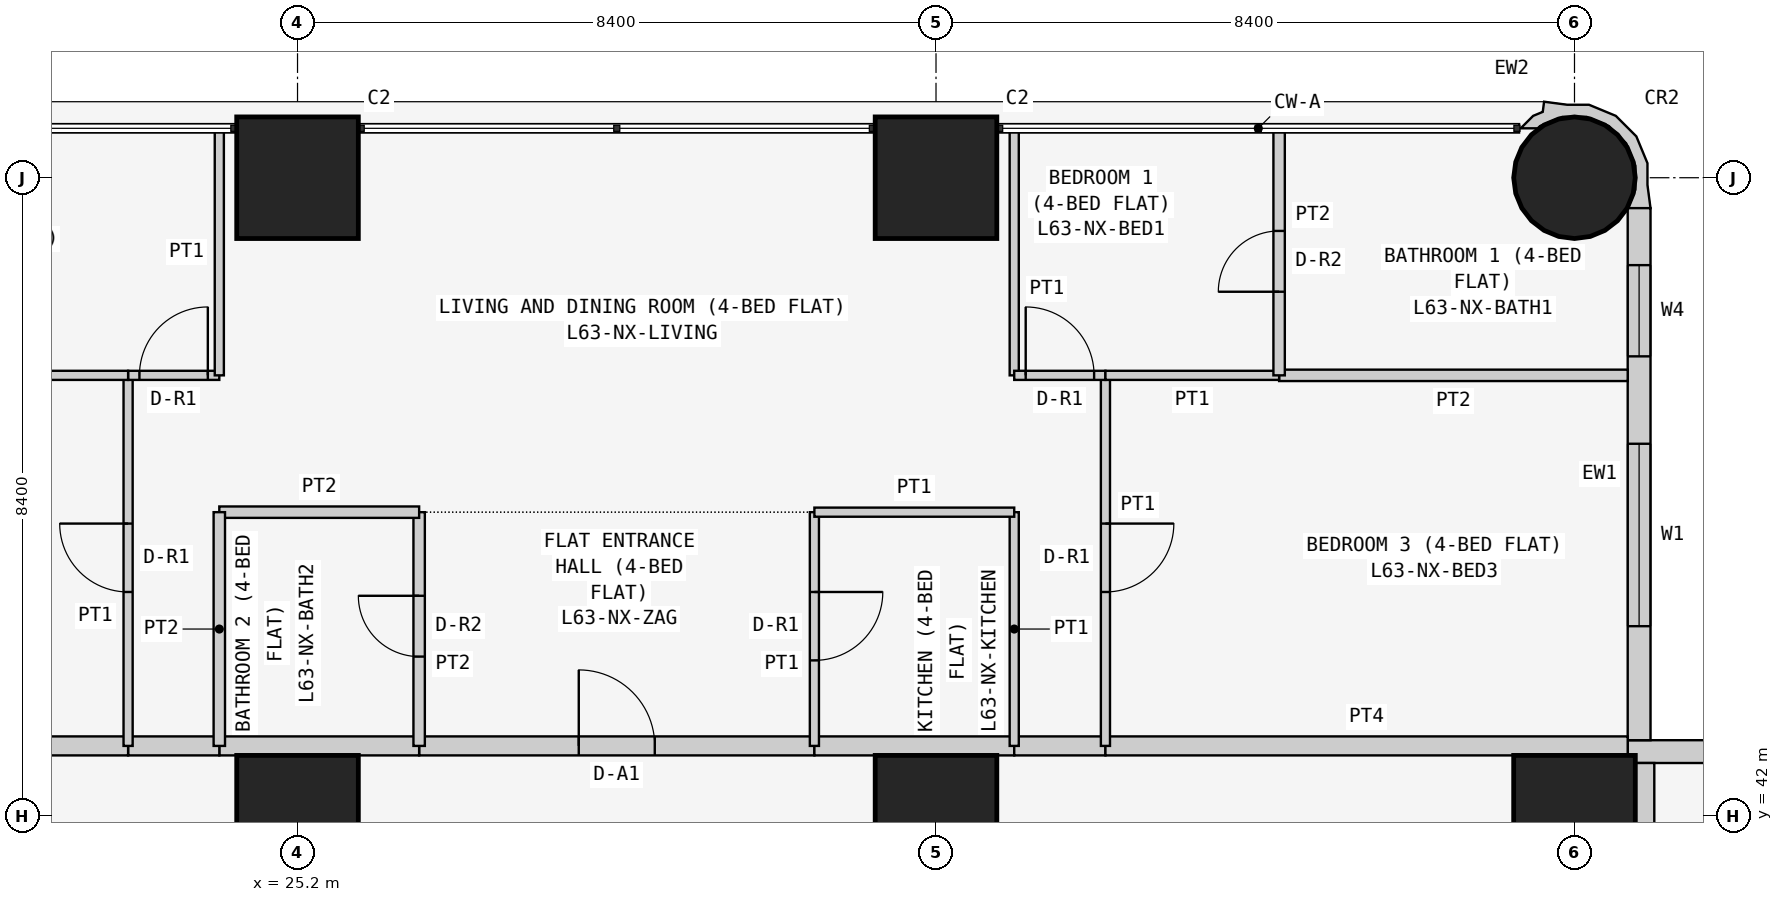
"""IFC4 building model, lengths in metres.
Left out: names, types, materials, properties, quantities, classifications, styles, units other than length and angle.
Written with IfcOpenShell. Run it as: python <this file> out.ifc"""

import sys

from ifc_helpers import new_model, si_unit, direction, frame, frame_2d, origin, origin_2d, place, context, subcontext, project, spatial, polyline, rectangle, circle, outline, extrude, element, fill, save


model = new_model("IFC4")
c1 = context("Model", 3, precision=1e-05, world=origin(), true_north=direction((0.0, 1.0)))
c2 = subcontext(c1, "Body", "Model", "MODEL_VIEW")
j1 = project(units=[si_unit("LENGTHUNIT", "METRE"), si_unit("PLANEANGLEUNIT", "RADIAN")], contexts=[c1])
p1 = place(None, origin())
s1 = spatial("IfcSite", under=j1, at=p1, CompositionType="ELEMENT")
p2 = place(p1, origin())
s2 = spatial("IfcBuilding", under=s1, at=p2, CompositionType="ELEMENT")
p3 = place(p2, frame((0.0, 0.0, 240.9)))
s3 = spatial("IfcBuildingStorey", under=s2, at=p3, CompositionType="ELEMENT", Elevation=240.9)
for number, where, z_axis, x_axis in (
    (1, (25.2, 42.0, 0.0), (0.0, 0.0, 1.0), (1.0, 0.0, 0.0)),
    (2, (25.2, 50.4, 0.0), (0.0, 0.0, 1.0), (1.0, 0.0, 0.0)),
    (3, (33.6, 42.0, 0.0), (0.0, 0.0, 1.0), (1.0, 0.0, 0.0)),
    (4, (33.6, 50.4, 0.0), (0.0, 0.0, 1.0), (1.0, 0.0, 0.0)),
    (5, (42.0, 42.0, 0.0), (0.0, 0.0, 1.0), (1.0, 0.0, 0.0)),
):
    element("IfcColumn", number, at=place(p3, frame(where, z_axis=z_axis, x_axis=x_axis)), inside=s3, PredefinedType="COLUMN", context=c2, shape_type="SweptSolid", body=[
        extrude(rectangle(XDim=1.6, YDim=1.6, at=origin_2d()), origin(), (0.0, 0.0, 1.0), 3.6),
    ])
p4 = place(p3, frame((42.0, 50.4, 0.0), z_axis=(0.0, 0.0, 1.0), x_axis=(1.0, 0.0, 0.0)))
e6 = element("IfcColumn", 6, at=p4, inside=s3, PredefinedType="COLUMN", context=c2, shape_type="SweptSolid", body=[
    extrude(circle(Radius=0.8, at=origin_2d()), origin(), (0.0, 0.0, 1.0), 3.6),
])
p5 = place(p3, frame((50.0, 42.85, 0.0), z_axis=(0.0, 0.0, 1.0), x_axis=(-1.0, 0.0, 0.0)))
e7 = element("IfcWall", 7, at=p5, inside=s3, PredefinedType="SOLIDWALL", context=c2, shape_type="SweptSolid", body=[
    extrude(rectangle(XDim=7.3, YDim=0.3, at=frame_2d((3.65, 0.0))), origin(), (0.0, 0.0, 1.0), 3.45),
])
p6 = place(p5, frame((3.1, 0.0, 0.9)))
e8 = element("IfcOpeningElement", 8, at=p6, cuts=e7, PredefinedType="OPENING", context=c2, shape_type="SweptSolid", body=[
    extrude(rectangle(XDim=2.4, YDim=1.5, at=frame_2d((1.2, 0.75))), frame((0.0, 0.16, 0.0), z_axis=(0.0, -1.0, 0.0), x_axis=(1.0, 0.0, 0.0)), (0.0, 0.0, 1.0), 0.32),
])
p7 = place(p5, frame((0.75, 0.0, 0.9)))
e9 = element("IfcOpeningElement", 9, at=p7, cuts=e7, PredefinedType="OPENING", context=c2, shape_type="SweptSolid", body=[
    extrude(rectangle(XDim=1.2, YDim=1.5, at=frame_2d((0.6, 0.75))), frame((0.0, 0.16, 0.0), z_axis=(0.0, -1.0, 0.0), x_axis=(1.0, 0.0, 0.0)), (0.0, 0.0, 1.0), 0.32),
])
p8 = place(p3, frame((42.85, 43.0, 0.0), z_axis=(0.0, 0.0, 1.0), x_axis=(0.0, 1.0, 0.0)))
e10 = element("IfcWall", 10, at=p8, inside=s3, PredefinedType="SOLIDWALL", context=c2, shape_type="SweptSolid", body=[
    extrude(rectangle(XDim=7.0, YDim=0.3, at=frame_2d((3.5, 0.0))), origin(), (0.0, 0.0, 1.0), 3.45),
])
p9 = place(p8, frame((1.5, 0.0, 0.9)))
e11 = element("IfcOpeningElement", 11, at=p9, cuts=e10, PredefinedType="OPENING", context=c2, shape_type="SweptSolid", body=[
    extrude(rectangle(XDim=2.4, YDim=1.5, at=frame_2d((1.2, 0.75))), frame((0.0, 0.16, 0.0), z_axis=(0.0, -1.0, 0.0), x_axis=(1.0, 0.0, 0.0)), (0.0, 0.0, 1.0), 0.32),
])
p10 = place(p8, frame((5.05, 0.0, 0.9)))
e12 = element("IfcOpeningElement", 12, at=p10, cuts=e10, PredefinedType="OPENING", context=c2, shape_type="SweptSolid", body=[
    extrude(rectangle(XDim=1.2, YDim=1.5, at=frame_2d((0.6, 0.75))), frame((0.0, 0.16, 0.0), z_axis=(0.0, -1.0, 0.0), x_axis=(1.0, 0.0, 0.0)), (0.0, 0.0, 1.0), 0.32),
])
p11 = place(p3, frame((42.817, 50.073, 0.0), z_axis=(0.0, 0.0, 1.0), x_axis=(0.343276641956, 0.93923434088, 0.0)))
e13 = element("IfcWall", 13, at=p11, inside=s3, PredefinedType="SOLIDWALL", context=c2, shape_type="SweptSolid", body=[
    extrude(outline(polyline([(0.266, -0.055), (0.535, 0.044), (0.817, 0.302), (0.978, 0.648), (0.994, 1.03), (0.895, 1.3), (0.828, 1.598), (0.697, 1.569), (0.604, 1.67), (0.394, 1.767), (0.471, 1.556), (0.509, 1.539), (0.724, 1.304), (0.833, 1.005), (0.82, 0.687), (0.686, 0.397), (0.451, 0.182), (0.152, 0.073), (-0.116, 0.084), (-0.128, 0.078), (-0.146, 0.071), (-0.006, -0.197), (0.266, -0.055)])), origin(), (0.0, 0.0, 1.0), 3.45),
])
p12 = place(p3, frame((26.8, 42.925, 0.0), z_axis=(0.0, 0.0, 1.0), x_axis=(1.0, 0.0, 0.0)))
e14 = element("IfcWall", 14, at=p12, inside=s3, PredefinedType="PARTITIONING", context=c2, shape_type="SweptSolid", body=[
    extrude(rectangle(XDim=5.2, YDim=0.25, at=frame_2d((2.6, 0.0))), origin(), (0.0, 0.0, 1.0), 3.45),
])
p13 = place(p12, frame((2.1, 0.0, 0.0)))
e15 = element("IfcOpeningElement", 15, at=p13, cuts=e14, PredefinedType="OPENING", context=c2, shape_type="SweptSolid", body=[
    extrude(rectangle(XDim=1.0, YDim=2.1, at=frame_2d((0.5, 1.05))), frame((0.0, 0.135, 0.0), z_axis=(0.0, -1.0, 0.0), x_axis=(1.0, 0.0, 0.0)), (0.0, 0.0, 1.0), 0.27),
])
p14 = place(p3, frame((24.171, 42.925, 0.0), z_axis=(0.0, 0.0, 1.0), x_axis=(1.0, 0.0, 0.0)))
e16 = element("IfcWall", 16, at=p14, inside=s3, PredefinedType="PARTITIONING", context=c2, shape_type="SweptSolid", body=[
    extrude(rectangle(XDim=2.629, YDim=0.25, at=frame_2d((1.314, 0.0))), origin(), (0.0, 0.0, 1.0), 3.45),
])
p15 = place(p3, frame((32.0, 42.925, 0.0), z_axis=(0.0, 0.0, 1.0), x_axis=(1.0, 0.0, 0.0)))
e17 = element("IfcWall", 17, at=p15, inside=s3, PredefinedType="PARTITIONING", context=c2, shape_type="SweptSolid", body=[
    extrude(rectangle(XDim=2.629, YDim=0.25, at=frame_2d((1.314, 0.0))), origin(), (0.0, 0.0, 1.0), 3.45),
])
p16 = place(p3, frame((22.971, 42.925, 0.0), z_axis=(0.0, 0.0, 1.0), x_axis=(1.0, 0.0, 0.0)))
e18 = element("IfcWall", 18, at=p16, inside=s3, PredefinedType="PARTITIONING", context=c2, shape_type="SweptSolid", body=[
    extrude(rectangle(XDim=1.2, YDim=0.25, at=frame_2d((0.6, 0.0))), origin(), (0.0, 0.0, 1.0), 3.45),
])
p17 = place(p3, frame((34.629, 42.925, 0.0), z_axis=(0.0, 0.0, 1.0), x_axis=(1.0, 0.0, 0.0)))
e19 = element("IfcWall", 19, at=p17, inside=s3, PredefinedType="PARTITIONING", context=c2, shape_type="SweptSolid", body=[
    extrude(rectangle(XDim=1.2, YDim=0.25, at=frame_2d((0.6, 0.0))), origin(), (0.0, 0.0, 1.0), 3.45),
])
for number, where, z_axis, x_axis in (
    (20, (16.1, 42.925, 0.0), (0.0, 0.0, 1.0), (1.0, 0.0, 0.0)),
    (21, (35.829, 42.925, 0.0), (0.0, 0.0, 1.0), (1.0, 0.0, 0.0)),
):
    element("IfcWall", number, at=place(p3, frame(where, z_axis=z_axis, x_axis=x_axis)), inside=s3, PredefinedType="PARTITIONING", context=c2, shape_type="SweptSolid", body=[
        extrude(rectangle(XDim=6.871, YDim=0.25, at=frame_2d((3.436, 0.0))), origin(), (0.0, 0.0, 1.0), 3.45),
    ])
p18 = place(p3, frame((42.925, 42.7, 0.0), z_axis=(0.0, 0.0, 1.0), x_axis=(0.0, -1.0, 0.0)))
e22 = element("IfcWall", 22, at=p18, inside=s3, PredefinedType="PARTITIONING", context=c2, shape_type="SweptSolid", body=[
    extrude(rectangle(XDim=6.471, YDim=0.25, at=frame_2d((3.235, 0.0))), origin(), (0.0, 0.0, 1.0), 3.45),
])
p19 = place(p3, frame((26.8, 46.0, 0.0), z_axis=(0.0, 0.0, 1.0), x_axis=(0.0, -1.0, 0.0)))
e23 = element("IfcWall", 23, at=p19, inside=s3, PredefinedType="PARTITIONING", context=c2, shape_type="SweptSolid", body=[
    extrude(rectangle(XDim=3.075, YDim=0.15, at=frame_2d((1.538, 0.0))), origin(), (0.0, 0.0, 1.0), 3.45),
])
p20 = place(p19, frame((1.1, 0.0, 0.0)))
e24 = element("IfcOpeningElement", 24, at=p20, cuts=e23, PredefinedType="OPENING", context=c2, shape_type="SweptSolid", body=[
    extrude(rectangle(XDim=0.8, YDim=2.1, at=frame_2d((0.4, 1.05))), frame((0.0, 0.085, 0.0), z_axis=(0.0, -1.0, 0.0), x_axis=(1.0, 0.0, 0.0)), (0.0, 0.0, 1.0), 0.17),
])
p21 = place(p3, frame((32.0, 42.925, 0.0), z_axis=(0.0, 0.0, 1.0), x_axis=(0.0, 1.0, 0.0)))
e25 = element("IfcWall", 25, at=p21, inside=s3, PredefinedType="PARTITIONING", context=c2, shape_type="SweptSolid", body=[
    extrude(rectangle(XDim=3.075, YDim=0.12, at=frame_2d((1.538, 0.0))), origin(), (0.0, 0.0, 1.0), 3.45),
])
p22 = place(p21, frame((1.125, 0.0, 0.0)))
e26 = element("IfcOpeningElement", 26, at=p22, cuts=e25, PredefinedType="OPENING", context=c2, shape_type="SweptSolid", body=[
    extrude(rectangle(XDim=0.9, YDim=2.1, at=frame_2d((0.45, 1.05))), frame((0.0, 0.07, 0.0), z_axis=(0.0, -1.0, 0.0), x_axis=(1.0, 0.0, 0.0)), (0.0, 0.0, 1.0), 0.14),
])
p23 = place(p3, frame((26.8, 46.0, 0.0), z_axis=(0.0, 0.0, 1.0), x_axis=(-1.0, 0.0, 0.0)))
e27 = element("IfcWall", 27, at=p23, inside=s3, PredefinedType="PARTITIONING", context=c2, shape_type="SweptSolid", body=[
    extrude(rectangle(XDim=2.629, YDim=0.15, at=frame_2d((1.314, 0.0))), origin(), (0.0, 0.0, 1.0), 3.45),
])
p24 = place(p3, frame((24.171, 46.0, 0.0), z_axis=(0.0, 0.0, 1.0), x_axis=(0.0, -1.0, 0.0)))
e28 = element("IfcWall", 28, at=p24, inside=s3, PredefinedType="PARTITIONING", context=c2, shape_type="SweptSolid", body=[
    extrude(rectangle(XDim=3.075, YDim=0.15, at=frame_2d((1.538, 0.0))), origin(), (0.0, 0.0, 1.0), 3.45),
])
p25 = place(p3, frame((34.629, 42.925, 0.0), z_axis=(0.0, 0.0, 1.0), x_axis=(0.0, 1.0, 0.0)))
e29 = element("IfcWall", 29, at=p25, inside=s3, PredefinedType="PARTITIONING", context=c2, shape_type="SweptSolid", body=[
    extrude(rectangle(XDim=3.075, YDim=0.12, at=frame_2d((1.538, 0.0))), origin(), (0.0, 0.0, 1.0), 3.45),
])
p26 = place(p3, frame((34.629, 46.0, 0.0), z_axis=(0.0, 0.0, 1.0), x_axis=(-1.0, 0.0, 0.0)))
e30 = element("IfcWall", 30, at=p26, inside=s3, PredefinedType="PARTITIONING", context=c2, shape_type="SweptSolid", body=[
    extrude(rectangle(XDim=2.629, YDim=0.12, at=frame_2d((1.314, 0.0))), origin(), (0.0, 0.0, 1.0), 3.45),
])
p27 = place(p3, frame((22.971, 42.925, 0.0), z_axis=(0.0, 0.0, 1.0), x_axis=(0.0, 1.0, 0.0)))
e31 = element("IfcWall", 31, at=p27, inside=s3, PredefinedType="PARTITIONING", context=c2, shape_type="SweptSolid", body=[
    extrude(rectangle(XDim=4.875, YDim=0.12, at=frame_2d((2.438, 0.0))), origin(), (0.0, 0.0, 1.0), 3.45),
])
p28 = place(p27, frame((2.025, 0.0, 0.0)))
e32 = element("IfcOpeningElement", 32, at=p28, cuts=e31, PredefinedType="OPENING", context=c2, shape_type="SweptSolid", body=[
    extrude(rectangle(XDim=0.9, YDim=2.1, at=frame_2d((0.45, 1.05))), frame((0.0, 0.07, 0.0), z_axis=(0.0, -1.0, 0.0), x_axis=(1.0, 0.0, 0.0)), (0.0, 0.0, 1.0), 0.14),
])
p29 = place(p3, frame((22.971, 47.8, 0.0), z_axis=(0.0, 0.0, 1.0), x_axis=(1.0, 0.0, 0.0)))
e33 = element("IfcWall", 33, at=p29, inside=s3, PredefinedType="PARTITIONING", context=c2, shape_type="SweptSolid", body=[
    extrude(rectangle(XDim=1.2, YDim=0.12, at=frame_2d((0.6, 0.0))), origin(), (0.0, 0.0, 1.0), 3.45),
])
p30 = place(p29, frame((0.149, 0.0, 0.0)))
e34 = element("IfcOpeningElement", 34, at=p30, cuts=e33, PredefinedType="OPENING", context=c2, shape_type="SweptSolid", body=[
    extrude(rectangle(XDim=0.9, YDim=2.1, at=frame_2d((0.45, 1.05))), frame((0.0, 0.07, 0.0), z_axis=(0.0, -1.0, 0.0), x_axis=(1.0, 0.0, 0.0)), (0.0, 0.0, 1.0), 0.14),
])
p31 = place(p3, frame((24.171, 47.8, 0.0), z_axis=(0.0, 0.0, 1.0), x_axis=(0.0, 1.0, 0.0)))
e35 = element("IfcWall", 35, at=p31, inside=s3, PredefinedType="PARTITIONING", context=c2, shape_type="SweptSolid", body=[
    extrude(rectangle(XDim=3.25, YDim=0.12, at=frame_2d((1.625, 0.0))), origin(), (0.0, 0.0, 1.0), 3.45),
])
p32 = place(p3, frame((35.829, 47.8, 0.0), z_axis=(0.0, 0.0, 1.0), x_axis=(0.0, -1.0, 0.0)))
e36 = element("IfcWall", 36, at=p32, inside=s3, PredefinedType="PARTITIONING", context=c2, shape_type="SweptSolid", body=[
    extrude(rectangle(XDim=4.875, YDim=0.12, at=frame_2d((2.438, 0.0))), origin(), (0.0, 0.0, 1.0), 3.45),
])
p33 = place(p32, frame((1.95, 0.0, 0.0)))
e37 = element("IfcOpeningElement", 37, at=p33, cuts=e36, PredefinedType="OPENING", context=c2, shape_type="SweptSolid", body=[
    extrude(rectangle(XDim=0.9, YDim=2.1, at=frame_2d((0.45, 1.05))), frame((0.0, 0.07, 0.0), z_axis=(0.0, -1.0, 0.0), x_axis=(1.0, 0.0, 0.0)), (0.0, 0.0, 1.0), 0.14),
])
p34 = place(p3, frame((34.629, 51.05, 0.0), z_axis=(0.0, 0.0, 1.0), x_axis=(0.0, -1.0, 0.0)))
e38 = element("IfcWall", 38, at=p34, inside=s3, PredefinedType="PARTITIONING", context=c2, shape_type="SweptSolid", body=[
    extrude(rectangle(XDim=3.25, YDim=0.12, at=frame_2d((1.625, 0.0))), origin(), (0.0, 0.0, 1.0), 3.45),
])
p35 = place(p3, frame((34.629, 47.8, 0.0), z_axis=(0.0, 0.0, 1.0), x_axis=(1.0, 0.0, 0.0)))
e39 = element("IfcWall", 39, at=p35, inside=s3, PredefinedType="PARTITIONING", context=c2, shape_type="SweptSolid", body=[
    extrude(rectangle(XDim=1.2, YDim=0.12, at=frame_2d((0.6, 0.0))), origin(), (0.0, 0.0, 1.0), 3.45),
])
p36 = place(p35, frame((0.151, 0.0, 0.0)))
e40 = element("IfcOpeningElement", 40, at=p36, cuts=e39, PredefinedType="OPENING", context=c2, shape_type="SweptSolid", body=[
    extrude(rectangle(XDim=0.9, YDim=2.1, at=frame_2d((0.45, 1.05))), frame((0.0, 0.07, 0.0), z_axis=(0.0, -1.0, 0.0), x_axis=(1.0, 0.0, 0.0)), (0.0, 0.0, 1.0), 0.14),
])
p37 = place(p3, frame((22.971, 47.8, 0.0), z_axis=(0.0, 0.0, 1.0), x_axis=(-1.0, 0.0, 0.0)))
e41 = element("IfcWall", 41, at=p37, inside=s3, PredefinedType="PARTITIONING", context=c2, shape_type="SweptSolid", body=[
    extrude(rectangle(XDim=6.871, YDim=0.12, at=frame_2d((3.436, 0.0))), origin(), (0.0, 0.0, 1.0), 3.45),
])
p38 = place(p3, frame((42.7, 47.8, 0.0), z_axis=(0.0, 0.0, 1.0), x_axis=(-1.0, 0.0, 0.0)))
e42 = element("IfcWall", 42, at=p38, inside=s3, PredefinedType="PARTITIONING", context=c2, shape_type="SweptSolid", body=[
    extrude(rectangle(XDim=4.586, YDim=0.15, at=frame_2d((2.293, 0.0))), origin(), (0.0, 0.0, 1.0), 3.45),
])
p39 = place(p3, frame((38.114, 47.8, 0.0), z_axis=(0.0, 0.0, 1.0), x_axis=(-1.0, 0.0, 0.0)))
e43 = element("IfcWall", 43, at=p39, inside=s3, PredefinedType="PARTITIONING", context=c2, shape_type="SweptSolid", body=[
    extrude(rectangle(XDim=2.285, YDim=0.12, at=frame_2d((1.143, 0.0))), origin(), (0.0, 0.0, 1.0), 3.45),
])
p40 = place(p3, frame((38.114, 51.05, 0.0), z_axis=(0.0, 0.0, 1.0), x_axis=(0.0, -1.0, 0.0)))
e44 = element("IfcWall", 44, at=p40, inside=s3, PredefinedType="PARTITIONING", context=c2, shape_type="SweptSolid", body=[
    extrude(rectangle(XDim=3.25, YDim=0.15, at=frame_2d((1.625, 0.0))), origin(), (0.0, 0.0, 1.0), 3.45),
])
p41 = place(p40, frame((1.35, 0.0, 0.0)))
e45 = element("IfcOpeningElement", 45, at=p41, cuts=e44, PredefinedType="OPENING", context=c2, shape_type="SweptSolid", body=[
    extrude(rectangle(XDim=0.8, YDim=2.1, at=frame_2d((0.4, 1.05))), frame((0.0, 0.085, 0.0), z_axis=(0.0, -1.0, 0.0), x_axis=(1.0, 0.0, 0.0)), (0.0, 0.0, 1.0), 0.17),
])
p42 = place(p9, origin())
e46 = element("IfcWindow", 46, at=p42, inside=s3, PartitioningType="SINGLE_PANEL", PredefinedType="WINDOW", context=c2, shape_type="SweptSolid", body=[
    extrude(rectangle(XDim=2.4, YDim=1.5, at=frame_2d((1.2, 0.75))), frame((0.0, 0.03, 0.0), z_axis=(0.0, -1.0, 0.0), x_axis=(1.0, 0.0, 0.0)), (0.0, 0.0, 1.0), 0.06),
])
fill(e11, e46)
p43 = place(p10, origin())
e47 = element("IfcWindow", 47, at=p43, inside=s3, PartitioningType="SINGLE_PANEL", PredefinedType="WINDOW", context=c2, shape_type="SweptSolid", body=[
    extrude(rectangle(XDim=1.2, YDim=1.5, at=frame_2d((0.6, 0.75))), frame((0.0, 0.03, 0.0), z_axis=(0.0, -1.0, 0.0), x_axis=(1.0, 0.0, 0.0)), (0.0, 0.0, 1.0), 0.06),
])
fill(e12, e47)
p44 = place(p13, origin())
e48 = element("IfcDoor", 48, at=p44, inside=s3, OperationType="SINGLE_SWING_LEFT", PredefinedType="DOOR", context=c2, shape_type="SweptSolid", body=[
    extrude(rectangle(XDim=1.0, YDim=2.1, at=frame_2d((0.5, 1.05))), frame((0.0, 0.025, 0.0), z_axis=(0.0, -1.0, 0.0), x_axis=(1.0, 0.0, 0.0)), (0.0, 0.0, 1.0), 0.05),
])
fill(e15, e48)
p45 = place(p20, frame((0.8, 0.0, 0.0), z_axis=(0.0, 0.0, 1.0), x_axis=(-1.0, 0.0, 0.0)))
e49 = element("IfcDoor", 49, at=p45, inside=s3, OperationType="SINGLE_SWING_RIGHT", PredefinedType="DOOR", context=c2, shape_type="SweptSolid", body=[
    extrude(rectangle(XDim=0.8, YDim=2.1, at=frame_2d((0.4, 1.05))), frame((0.0, 0.025, 0.0), z_axis=(0.0, -1.0, 0.0), x_axis=(1.0, 0.0, 0.0)), (0.0, 0.0, 1.0), 0.05),
])
fill(e24, e49)
p46 = place(p22, frame((0.9, 0.0, 0.0), z_axis=(0.0, 0.0, 1.0), x_axis=(-1.0, 0.0, 0.0)))
e50 = element("IfcDoor", 50, at=p46, inside=s3, OperationType="SINGLE_SWING_LEFT", PredefinedType="DOOR", context=c2, shape_type="SweptSolid", body=[
    extrude(rectangle(XDim=0.9, YDim=2.1, at=frame_2d((0.45, 1.05))), frame((0.0, 0.025, 0.0), z_axis=(0.0, -1.0, 0.0), x_axis=(1.0, 0.0, 0.0)), (0.0, 0.0, 1.0), 0.05),
])
fill(e26, e50)
p47 = place(p28, origin())
e51 = element("IfcDoor", 51, at=p47, inside=s3, OperationType="SINGLE_SWING_RIGHT", PredefinedType="DOOR", context=c2, shape_type="SweptSolid", body=[
    extrude(rectangle(XDim=0.9, YDim=2.1, at=frame_2d((0.45, 1.05))), frame((0.0, 0.025, 0.0), z_axis=(0.0, -1.0, 0.0), x_axis=(1.0, 0.0, 0.0)), (0.0, 0.0, 1.0), 0.05),
])
fill(e32, e51)
p48 = place(p30, origin())
e52 = element("IfcDoor", 52, at=p48, inside=s3, OperationType="SINGLE_SWING_RIGHT", PredefinedType="DOOR", context=c2, shape_type="SweptSolid", body=[
    extrude(rectangle(XDim=0.9, YDim=2.1, at=frame_2d((0.45, 1.05))), frame((0.0, 0.025, 0.0), z_axis=(0.0, -1.0, 0.0), x_axis=(1.0, 0.0, 0.0)), (0.0, 0.0, 1.0), 0.05),
])
fill(e34, e52)
p49 = place(p33, origin())
e53 = element("IfcDoor", 53, at=p49, inside=s3, OperationType="SINGLE_SWING_LEFT", PredefinedType="DOOR", context=c2, shape_type="SweptSolid", body=[
    extrude(rectangle(XDim=0.9, YDim=2.1, at=frame_2d((0.45, 1.05))), frame((0.0, 0.025, 0.0), z_axis=(0.0, -1.0, 0.0), x_axis=(1.0, 0.0, 0.0)), (0.0, 0.0, 1.0), 0.05),
])
fill(e37, e53)
p50 = place(p36, origin())
e54 = element("IfcDoor", 54, at=p50, inside=s3, OperationType="SINGLE_SWING_LEFT", PredefinedType="DOOR", context=c2, shape_type="SweptSolid", body=[
    extrude(rectangle(XDim=0.9, YDim=2.1, at=frame_2d((0.45, 1.05))), frame((0.0, 0.025, 0.0), z_axis=(0.0, -1.0, 0.0), x_axis=(1.0, 0.0, 0.0)), (0.0, 0.0, 1.0), 0.05),
])
fill(e40, e54)
p51 = place(p41, frame((0.8, 0.0, 0.0), z_axis=(0.0, 0.0, 1.0), x_axis=(-1.0, 0.0, 0.0)))
e55 = element("IfcDoor", 55, at=p51, inside=s3, OperationType="SINGLE_SWING_LEFT", PredefinedType="DOOR", context=c2, shape_type="SweptSolid", body=[
    extrude(rectangle(XDim=0.8, YDim=2.1, at=frame_2d((0.4, 1.05))), frame((0.0, 0.025, 0.0), z_axis=(0.0, -1.0, 0.0), x_axis=(1.0, 0.0, 0.0)), (0.0, 0.0, 1.0), 0.05),
])
fill(e45, e55)
save(model, sys.argv[1])
